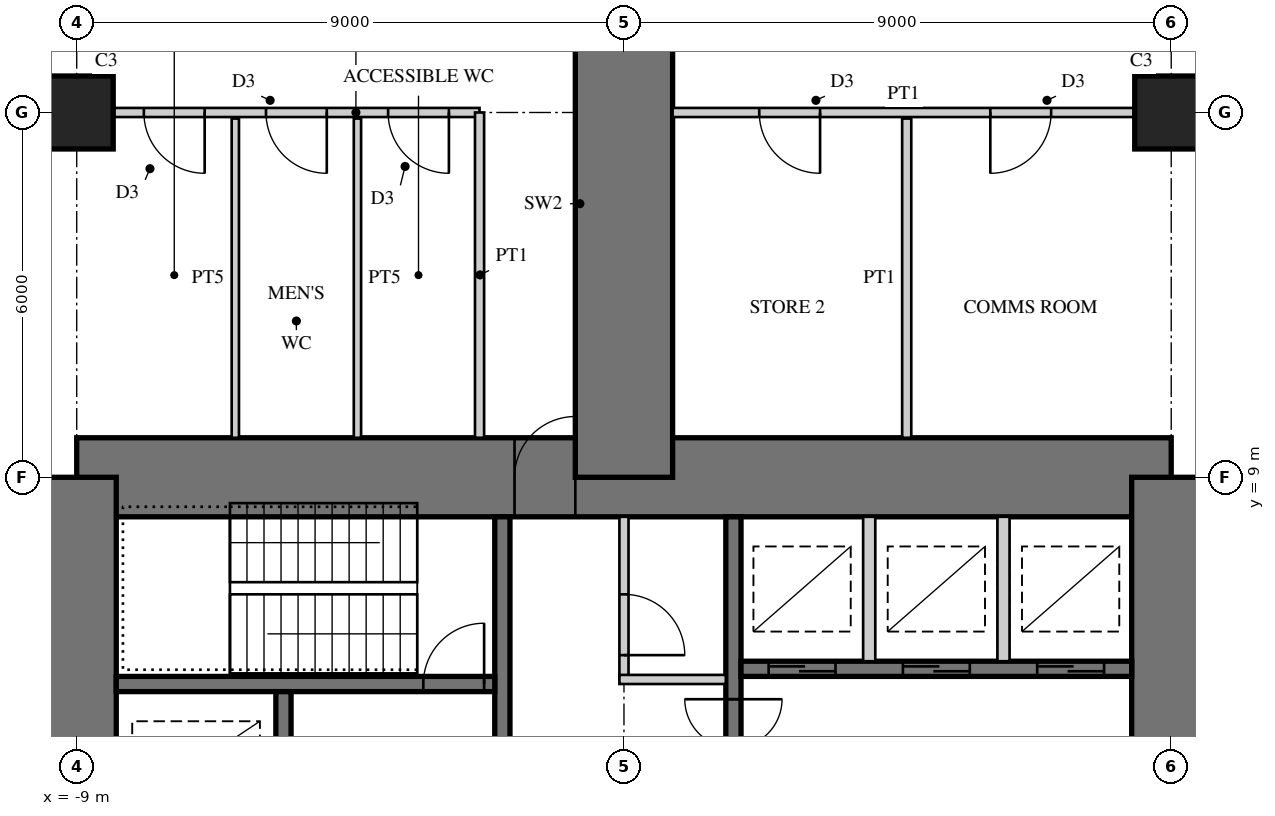
"""IFC4 building model, lengths in metres.
Left out: names, types, materials, properties, quantities, classifications, styles, units other than length and angle.
Written with IfcOpenShell. Run it as: python <this file> out.ifc"""

import sys

from ifc_helpers import new_model, si_unit, direction, frame, frame_2d, origin, origin_2d, place, context, subcontext, project, spatial, rectangle, extrude, element, fill, save


model = new_model("IFC4")
c1 = context("Model", 3, precision=1e-05, world=origin(), true_north=direction((0.0, 1.0)))
c2 = subcontext(c1, "Body", "Model", "MODEL_VIEW")
j1 = project(units=[si_unit("LENGTHUNIT", "METRE"), si_unit("PLANEANGLEUNIT", "RADIAN")], contexts=[c1])
p1 = place(None, origin())
s1 = spatial("IfcSite", under=j1, at=p1, CompositionType="ELEMENT")
p2 = place(p1, origin())
s2 = spatial("IfcBuilding", under=s1, at=p2, CompositionType="ELEMENT")
p3 = place(p2, frame((0.0, 0.0, 23.5)))
s3 = spatial("IfcBuildingStorey", under=s2, at=p3, CompositionType="ELEMENT", Elevation=23.5)
p4 = place(p3, frame((9.0, 9.0, 0.0), z_axis=(0.0, 0.0, 1.0), x_axis=(-1.0, 0.0, 0.0)))
e1 = element("IfcWall", 1, at=p4, inside=s3, PredefinedType="SHEAR", context=c2, shape_type="SweptSolid", body=[
    extrude(rectangle(XDim=18.0, YDim=1.3, at=frame_2d((9.0, 0.0))), origin(), (0.0, 0.0, 1.0), 4.0),
])
p5 = place(p4, frame((9.8, 0.0, 0.0)))
e2 = element("IfcOpeningElement", 2, at=p5, cuts=e1, PredefinedType="OPENING", context=c2, shape_type="SweptSolid", body=[
    extrude(rectangle(XDim=1.0, YDim=2.4, at=frame_2d((0.5, 1.2))), frame((0.0, 0.66, 0.0), z_axis=(0.0, -1.0, 0.0), x_axis=(1.0, 0.0, 0.0)), (0.0, 0.0, 1.0), 1.32),
])
p6 = place(p3, frame((9.0, -9.0, 0.0), z_axis=(0.0, 0.0, 1.0), x_axis=(0.0, 1.0, 0.0)))
e3 = element("IfcWall", 3, at=p6, inside=s3, PredefinedType="SHEAR", context=c2, shape_type="SweptSolid", body=[
    extrude(rectangle(XDim=18.0, YDim=1.3, at=frame_2d((9.0, 0.0))), origin(), (0.0, 0.0, 1.0), 4.0),
])
p7 = place(p6, frame((9.8, 0.0, 0.0)))
e4 = element("IfcOpeningElement", 4, at=p7, cuts=e3, PredefinedType="OPENING", context=c2, shape_type="SweptSolid", body=[
    extrude(rectangle(XDim=1.0, YDim=2.4, at=frame_2d((0.5, 1.2))), frame((0.0, 0.66, 0.0), z_axis=(0.0, -1.0, 0.0), x_axis=(1.0, 0.0, 0.0)), (0.0, 0.0, 1.0), 1.32),
])
p8 = place(p3, frame((-9.0, 9.0, 0.0), z_axis=(0.0, 0.0, 1.0), x_axis=(0.0, -1.0, 0.0)))
e5 = element("IfcWall", 5, at=p8, inside=s3, PredefinedType="SHEAR", context=c2, shape_type="SweptSolid", body=[
    extrude(rectangle(XDim=18.0, YDim=1.3, at=frame_2d((9.0, 0.0))), origin(), (0.0, 0.0, 1.0), 4.0),
])
p9 = place(p8, frame((9.8, 0.0, 0.0)))
e6 = element("IfcOpeningElement", 6, at=p9, cuts=e5, PredefinedType="OPENING", context=c2, shape_type="SweptSolid", body=[
    extrude(rectangle(XDim=1.0, YDim=2.4, at=frame_2d((0.5, 1.2))), frame((0.0, 0.66, 0.0), z_axis=(0.0, -1.0, 0.0), x_axis=(1.0, 0.0, 0.0)), (0.0, 0.0, 1.0), 1.32),
])
p10 = place(p3, frame((1.8, 1.875, 0.0), z_axis=(0.0, 0.0, 1.0), x_axis=(0.0, 1.0, 0.0)))
e7 = element("IfcWall", 7, at=p10, inside=s3, PredefinedType="SHEAR", context=c2, shape_type="SweptSolid", body=[
    extrude(rectangle(XDim=6.475, YDim=0.25, at=frame_2d((3.238, 0.0))), origin(), (0.0, 0.0, 1.0), 4.0),
])
p11 = place(p10, frame((1.875, 0.0, 0.0)))
e8 = element("IfcOpeningElement", 8, at=p11, cuts=e7, PredefinedType="OPENING", context=c2, shape_type="SweptSolid", body=[
    extrude(rectangle(XDim=1.6, YDim=2.4, at=frame_2d((0.8, 1.2))), frame((0.0, 0.135, 0.0), z_axis=(0.0, -1.0, 0.0), x_axis=(1.0, 0.0, 0.0)), (0.0, 0.0, 1.0), 0.27),
])
p12 = place(p3, frame((1.925, 5.85, 0.0), z_axis=(0.0, 0.0, 1.0), x_axis=(1.0, 0.0, 0.0)))
e9 = element("IfcWall", 9, at=p12, inside=s3, PredefinedType="SHEAR", context=c2, shape_type="SweptSolid", body=[
    extrude(rectangle(XDim=6.425, YDim=0.25, at=frame_2d((3.212, 0.0))), origin(), (0.0, 0.0, 1.0), 4.0),
])
p13 = place(p12, frame((0.454, 0.0, 0.0)))
e10 = element("IfcOpeningElement", 10, at=p13, cuts=e9, PredefinedType="OPENING", context=c2, shape_type="SweptSolid", body=[
    extrude(rectangle(XDim=1.1, YDim=2.2, at=frame_2d((0.55, 1.1))), frame((0.0, 0.135, 0.0), z_axis=(0.0, -1.0, 0.0), x_axis=(1.0, 0.0, 0.0)), (0.0, 0.0, 1.0), 0.27),
])
p14 = place(p12, frame((2.663, 0.0, 0.0)))
e11 = element("IfcOpeningElement", 11, at=p14, cuts=e9, PredefinedType="OPENING", context=c2, shape_type="SweptSolid", body=[
    extrude(rectangle(XDim=1.1, YDim=2.2, at=frame_2d((0.55, 1.1))), frame((0.0, 0.135, 0.0), z_axis=(0.0, -1.0, 0.0), x_axis=(1.0, 0.0, 0.0)), (0.0, 0.0, 1.0), 0.27),
])
p15 = place(p12, frame((4.871, 0.0, 0.0)))
e12 = element("IfcOpeningElement", 12, at=p15, cuts=e9, PredefinedType="OPENING", context=c2, shape_type="SweptSolid", body=[
    extrude(rectangle(XDim=1.1, YDim=2.2, at=frame_2d((0.55, 1.1))), frame((0.0, 0.135, 0.0), z_axis=(0.0, -1.0, 0.0), x_axis=(1.0, 0.0, 0.0)), (0.0, 0.0, 1.0), 0.27),
])
for number, where, z_axis, x_axis in (
    (13, (4.033, 5.975, 0.0), (0.0, 0.0, 1.0), (0.0, 1.0, 0.0)),
    (14, (6.242, 5.975, 0.0), (0.0, 0.0, 1.0), (0.0, 1.0, 0.0)),
):
    element("IfcWall", number, at=place(p3, frame(where, z_axis=z_axis, x_axis=x_axis)), inside=s3, PredefinedType="PARTITIONING", context=c2, shape_type="SweptSolid", body=[
        extrude(rectangle(XDim=2.375, YDim=0.2, at=frame_2d((1.188, 0.0))), origin(), (0.0, 0.0, 1.0), 4.0),
    ])
p16 = place(p3, frame((-2.0, 1.675, 0.0), z_axis=(0.0, 0.0, 1.0), x_axis=(0.0, 1.0, 0.0)))
e15 = element("IfcWall", 15, at=p16, inside=s3, PredefinedType="SHEAR", context=c2, shape_type="SweptSolid", body=[
    extrude(rectangle(XDim=6.675, YDim=0.25, at=frame_2d((3.337, 0.0))), origin(), (0.0, 0.0, 1.0), 4.0),
])
p17 = place(p16, frame((0.725, 0.0, 0.0)))
e16 = element("IfcOpeningElement", 16, at=p17, cuts=e15, PredefinedType="OPENING", context=c2, shape_type="SweptSolid", body=[
    extrude(rectangle(XDim=1.0, YDim=2.1, at=frame_2d((0.5, 1.05))), frame((0.0, 0.135, 0.0), z_axis=(0.0, -1.0, 0.0), x_axis=(1.0, 0.0, 0.0)), (0.0, 0.0, 1.0), 0.27),
])
p18 = place(p3, frame((-2.125, 5.6, 0.0), z_axis=(0.0, 0.0, 1.0), x_axis=(-1.0, 0.0, 0.0)))
e17 = element("IfcWall", 17, at=p18, inside=s3, PredefinedType="SHEAR", context=c2, shape_type="SweptSolid", body=[
    extrude(rectangle(XDim=6.225, YDim=0.25, at=frame_2d((3.113, 0.0))), origin(), (0.0, 0.0, 1.0), 4.0),
])
p19 = place(p18, frame((0.175, 0.0, 0.0)))
e18 = element("IfcOpeningElement", 18, at=p19, cuts=e17, PredefinedType="OPENING", context=c2, shape_type="SweptSolid", body=[
    extrude(rectangle(XDim=1.0, YDim=2.1, at=frame_2d((0.5, 1.05))), frame((0.0, 0.135, 0.0), z_axis=(0.0, -1.0, 0.0), x_axis=(1.0, 0.0, 0.0)), (0.0, 0.0, 1.0), 0.27),
])
p20 = place(p3, frame((-5.6, 1.925, 0.0), z_axis=(0.0, 0.0, 1.0), x_axis=(0.0, 1.0, 0.0)))
e19 = element("IfcWall", 19, at=p20, inside=s3, PredefinedType="SHEAR", context=c2, shape_type="SweptSolid", body=[
    extrude(rectangle(XDim=3.55, YDim=0.25, at=frame_2d((1.775, 0.0))), origin(), (0.0, 0.0, 1.0), 4.0),
])
p21 = place(p20, frame((1.525, 0.0, 0.0)))
e20 = element("IfcOpeningElement", 20, at=p21, cuts=e19, PredefinedType="OPENING", context=c2, shape_type="SweptSolid", body=[
    extrude(rectangle(XDim=1.1, YDim=2.2, at=frame_2d((0.55, 1.1))), frame((0.0, 0.135, 0.0), z_axis=(0.0, -1.0, 0.0), x_axis=(1.0, 0.0, 0.0)), (0.0, 0.0, 1.0), 0.27),
])
p22 = place(p20, frame((0.075, 0.0, 0.0)))
e21 = element("IfcOpeningElement", 21, at=p22, cuts=e19, PredefinedType="OPENING", context=c2, shape_type="SweptSolid", body=[
    extrude(rectangle(XDim=0.8, YDim=2.1, at=frame_2d((0.4, 1.05))), frame((0.0, 0.135, 0.0), z_axis=(0.0, -1.0, 0.0), x_axis=(1.0, 0.0, 0.0)), (0.0, 0.0, 1.0), 0.27),
])
p23 = place(p3, frame((0.0, 9.0, 0.0), z_axis=(0.0, 0.0, 1.0), x_axis=(0.0, 1.0, 0.0)))
e22 = element("IfcWall", 22, at=p23, inside=s3, PredefinedType="SHEAR", context=c2, shape_type="SweptSolid", body=[
    extrude(rectangle(XDim=9.0, YDim=1.6, at=frame_2d((4.5, 0.0))), origin(), (0.0, 0.0, 1.0), 4.0),
])
for number, where, z_axis, x_axis in (
    (23, (9.0, 15.0, 0.0), (0.0, 0.0, 1.0), (1.0, 0.0, 0.0)),
    (24, (-9.0, 15.0, 0.0), (0.0, 0.0, 1.0), (1.0, 0.0, 0.0)),
):
    element("IfcColumn", number, at=place(p3, frame(where, z_axis=z_axis, x_axis=x_axis)), inside=s3, PredefinedType="COLUMN", context=c2, shape_type="SweptSolid", body=[
        extrude(rectangle(XDim=1.2, YDim=1.2, at=origin_2d()), origin(), (0.0, 0.0, 1.0), 4.0),
    ])
p24 = place(p3, frame((0.0, 5.675, 0.0), z_axis=(0.0, 0.0, 1.0), x_axis=(0.0, 1.0, 0.0)))
e25 = element("IfcWall", 25, at=p24, inside=s3, PredefinedType="PARTITIONING", context=c2, shape_type="SweptSolid", body=[
    extrude(rectangle(XDim=2.675, YDim=0.15, at=frame_2d((1.337, 0.0))), origin(), (0.0, 0.0, 1.0), 3.8),
])
p25 = place(p24, frame((0.4, 0.0, 0.0)))
e26 = element("IfcOpeningElement", 26, at=p25, cuts=e25, PredefinedType="OPENING", context=c2, shape_type="SweptSolid", body=[
    extrude(rectangle(XDim=1.0, YDim=2.1, at=frame_2d((0.5, 1.05))), frame((0.0, 0.085, 0.0), z_axis=(0.0, -1.0, 0.0), x_axis=(1.0, 0.0, 0.0)), (0.0, 0.0, 1.0), 0.17),
])
p26 = place(p3, frame((1.675, 5.675, 0.0), z_axis=(0.0, 0.0, 1.0), x_axis=(-1.0, 0.0, 0.0)))
e27 = element("IfcWall", 27, at=p26, inside=s3, PredefinedType="PARTITIONING", context=c2, shape_type="SweptSolid", body=[
    extrude(rectangle(XDim=1.75, YDim=0.15, at=frame_2d((0.875, 0.0))), origin(), (0.0, 0.0, 1.0), 3.8),
])
p27 = place(p3, frame((-2.375, 15.0, 0.0), z_axis=(0.0, 0.0, 1.0), x_axis=(-1.0, 0.0, 0.0)))
e28 = element("IfcWall", 28, at=p27, inside=s3, PredefinedType="PARTITIONING", context=c2, shape_type="SweptSolid", body=[
    extrude(rectangle(XDim=6.025, YDim=0.15, at=frame_2d((3.012, 0.0))), origin(), (0.0, 0.0, 1.0), 2.95),
])
p28 = place(p27, frame((0.504, 0.0, 0.0)))
e29 = element("IfcOpeningElement", 29, at=p28, cuts=e28, PredefinedType="OPENING", context=c2, shape_type="SweptSolid", body=[
    extrude(rectangle(XDim=1.0, YDim=2.1, at=frame_2d((0.5, 1.05))), frame((0.0, 0.085, 0.0), z_axis=(0.0, -1.0, 0.0), x_axis=(1.0, 0.0, 0.0)), (0.0, 0.0, 1.0), 0.17),
])
p29 = place(p27, frame((2.512, 0.0, 0.0)))
e30 = element("IfcOpeningElement", 30, at=p29, cuts=e28, PredefinedType="OPENING", context=c2, shape_type="SweptSolid", body=[
    extrude(rectangle(XDim=1.0, YDim=2.1, at=frame_2d((0.5, 1.05))), frame((0.0, 0.085, 0.0), z_axis=(0.0, -1.0, 0.0), x_axis=(1.0, 0.0, 0.0)), (0.0, 0.0, 1.0), 0.17),
])
p30 = place(p27, frame((4.521, 0.0, 0.0)))
e31 = element("IfcOpeningElement", 31, at=p30, cuts=e28, PredefinedType="OPENING", context=c2, shape_type="SweptSolid", body=[
    extrude(rectangle(XDim=1.0, YDim=2.1, at=frame_2d((0.5, 1.05))), frame((0.0, 0.085, 0.0), z_axis=(0.0, -1.0, 0.0), x_axis=(1.0, 0.0, 0.0)), (0.0, 0.0, 1.0), 0.17),
])
p31 = place(p3, frame((-2.375, 9.65, 0.0), z_axis=(0.0, 0.0, 1.0), x_axis=(0.0, 1.0, 0.0)))
e32 = element("IfcWall", 32, at=p31, inside=s3, PredefinedType="PARTITIONING", context=c2, shape_type="SweptSolid", body=[
    extrude(rectangle(XDim=5.35, YDim=0.15, at=frame_2d((2.675, 0.0))), origin(), (0.0, 0.0, 1.0), 3.8),
])
for number, where, z_axis, x_axis in (
    (33, (-4.383, 9.65, 0.0), (0.0, 0.0, 1.0), (0.0, 1.0, 0.0)),
    (34, (-6.392, 9.65, 0.0), (0.0, 0.0, 1.0), (0.0, 1.0, 0.0)),
):
    element("IfcWall", number, at=place(p3, frame(where, z_axis=z_axis, x_axis=x_axis)), inside=s3, PredefinedType="PLUMBINGWALL", context=c2, shape_type="SweptSolid", body=[
        extrude(rectangle(XDim=5.25, YDim=0.12, at=frame_2d((2.625, 0.0))), origin(), (0.0, 0.0, 1.0), 3.8),
    ])
p32 = place(p3, frame((8.4, 15.0, 0.0), z_axis=(0.0, 0.0, 1.0), x_axis=(-1.0, 0.0, 0.0)))
e35 = element("IfcWall", 35, at=p32, inside=s3, PredefinedType="PARTITIONING", context=c2, shape_type="SweptSolid", body=[
    extrude(rectangle(XDim=7.6, YDim=0.15, at=frame_2d((3.8, 0.0))), origin(), (0.0, 0.0, 1.0), 2.95),
])
p33 = place(p32, frame((1.375, 0.0, 0.0)))
e36 = element("IfcOpeningElement", 36, at=p33, cuts=e35, PredefinedType="OPENING", context=c2, shape_type="SweptSolid", body=[
    extrude(rectangle(XDim=1.0, YDim=2.1, at=frame_2d((0.5, 1.05))), frame((0.0, 0.085, 0.0), z_axis=(0.0, -1.0, 0.0), x_axis=(1.0, 0.0, 0.0)), (0.0, 0.0, 1.0), 0.17),
])
p34 = place(p32, frame((5.175, 0.0, 0.0)))
e37 = element("IfcOpeningElement", 37, at=p34, cuts=e35, PredefinedType="OPENING", context=c2, shape_type="SweptSolid", body=[
    extrude(rectangle(XDim=1.0, YDim=2.1, at=frame_2d((0.5, 1.05))), frame((0.0, 0.085, 0.0), z_axis=(0.0, -1.0, 0.0), x_axis=(1.0, 0.0, 0.0)), (0.0, 0.0, 1.0), 0.17),
])
p35 = place(p3, frame((4.65, 9.65, 0.0), z_axis=(0.0, 0.0, 1.0), x_axis=(0.0, 1.0, 0.0)))
e38 = element("IfcWall", 38, at=p35, inside=s3, PredefinedType="PARTITIONING", context=c2, shape_type="SweptSolid", body=[
    extrude(rectangle(XDim=5.25, YDim=0.15, at=frame_2d((2.625, 0.0))), origin(), (0.0, 0.0, 1.0), 3.8),
])
p36 = place(p25, frame((1.0, 0.0, 0.0), z_axis=(0.0, 0.0, 1.0), x_axis=(-1.0, 0.0, 0.0)))
e39 = element("IfcDoor", 39, at=p36, inside=s3, OperationType="SINGLE_SWING_RIGHT", PredefinedType="DOOR", context=c2, shape_type="SweptSolid", body=[
    extrude(rectangle(XDim=1.0, YDim=2.1, at=frame_2d((0.5, 1.05))), frame((0.0, 0.025, 0.0), z_axis=(0.0, -1.0, 0.0), x_axis=(1.0, 0.0, 0.0)), (0.0, 0.0, 1.0), 0.05),
])
fill(e26, e39)
p37 = place(p28, origin())
e40 = element("IfcDoor", 40, at=p37, inside=s3, OperationType="SINGLE_SWING_LEFT", PredefinedType="DOOR", context=c2, shape_type="SweptSolid", body=[
    extrude(rectangle(XDim=1.0, YDim=2.1, at=frame_2d((0.5, 1.05))), frame((0.0, 0.025, 0.0), z_axis=(0.0, -1.0, 0.0), x_axis=(1.0, 0.0, 0.0)), (0.0, 0.0, 1.0), 0.05),
])
fill(e29, e40)
p38 = place(p29, origin())
e41 = element("IfcDoor", 41, at=p38, inside=s3, OperationType="SINGLE_SWING_LEFT", PredefinedType="DOOR", context=c2, shape_type="SweptSolid", body=[
    extrude(rectangle(XDim=1.0, YDim=2.1, at=frame_2d((0.5, 1.05))), frame((0.0, 0.025, 0.0), z_axis=(0.0, -1.0, 0.0), x_axis=(1.0, 0.0, 0.0)), (0.0, 0.0, 1.0), 0.05),
])
fill(e30, e41)
p39 = place(p30, origin())
e42 = element("IfcDoor", 42, at=p39, inside=s3, OperationType="SINGLE_SWING_LEFT", PredefinedType="DOOR", context=c2, shape_type="SweptSolid", body=[
    extrude(rectangle(XDim=1.0, YDim=2.1, at=frame_2d((0.5, 1.05))), frame((0.0, 0.025, 0.0), z_axis=(0.0, -1.0, 0.0), x_axis=(1.0, 0.0, 0.0)), (0.0, 0.0, 1.0), 0.05),
])
fill(e31, e42)
p40 = place(p33, origin())
e43 = element("IfcDoor", 43, at=p40, inside=s3, OperationType="SINGLE_SWING_RIGHT", PredefinedType="DOOR", context=c2, shape_type="SweptSolid", body=[
    extrude(rectangle(XDim=1.0, YDim=2.1, at=frame_2d((0.5, 1.05))), frame((0.0, 0.025, 0.0), z_axis=(0.0, -1.0, 0.0), x_axis=(1.0, 0.0, 0.0)), (0.0, 0.0, 1.0), 0.05),
])
fill(e36, e43)
p41 = place(p34, origin())
e44 = element("IfcDoor", 44, at=p41, inside=s3, OperationType="SINGLE_SWING_LEFT", PredefinedType="DOOR", context=c2, shape_type="SweptSolid", body=[
    extrude(rectangle(XDim=1.0, YDim=2.1, at=frame_2d((0.5, 1.05))), frame((0.0, 0.025, 0.0), z_axis=(0.0, -1.0, 0.0), x_axis=(1.0, 0.0, 0.0)), (0.0, 0.0, 1.0), 0.05),
])
fill(e37, e44)
p42 = place(p5, frame((1.0, 0.0, 0.0), z_axis=(0.0, 0.0, 1.0), x_axis=(-1.0, 0.0, 0.0)))
e45 = element("IfcDoor", 45, at=p42, inside=s3, OperationType="SINGLE_SWING_RIGHT", PredefinedType="DOOR", context=c2, shape_type="SweptSolid", body=[
    extrude(rectangle(XDim=1.0, YDim=2.4, at=frame_2d((0.5, 1.2))), frame((0.0, -0.005, 0.0), z_axis=(0.0, -1.0, 0.0), x_axis=(1.0, 0.0, 0.0)), (0.0, 0.0, 1.0), 0.05),
])
fill(e2, e45)
p43 = place(p13, origin())
e46 = element("IfcDoor", 46, at=p43, inside=s3, OperationType="DOUBLE_DOOR_SLIDING", PredefinedType="DOOR", context=c2, shape_type="SweptSolid", body=[
    extrude(rectangle(XDim=1.1, YDim=2.2, at=frame_2d((0.55, 1.1))), frame((0.0, 0.025, 0.0), z_axis=(0.0, -1.0, 0.0), x_axis=(1.0, 0.0, 0.0)), (0.0, 0.0, 1.0), 0.05),
])
fill(e10, e46)
p44 = place(p14, origin())
e47 = element("IfcDoor", 47, at=p44, inside=s3, OperationType="DOUBLE_DOOR_SLIDING", PredefinedType="DOOR", context=c2, shape_type="SweptSolid", body=[
    extrude(rectangle(XDim=1.1, YDim=2.2, at=frame_2d((0.55, 1.1))), frame((0.0, 0.025, 0.0), z_axis=(0.0, -1.0, 0.0), x_axis=(1.0, 0.0, 0.0)), (0.0, 0.0, 1.0), 0.05),
])
fill(e11, e47)
p45 = place(p15, origin())
e48 = element("IfcDoor", 48, at=p45, inside=s3, OperationType="DOUBLE_DOOR_SLIDING", PredefinedType="DOOR", context=c2, shape_type="SweptSolid", body=[
    extrude(rectangle(XDim=1.1, YDim=2.2, at=frame_2d((0.55, 1.1))), frame((0.0, 0.025, 0.0), z_axis=(0.0, -1.0, 0.0), x_axis=(1.0, 0.0, 0.0)), (0.0, 0.0, 1.0), 0.05),
])
fill(e12, e48)
p46 = place(p11, origin())
e49 = element("IfcDoor", 49, at=p46, inside=s3, OperationType="DOUBLE_DOOR_DOUBLE_SWING", PredefinedType="DOOR", context=c2, shape_type="SweptSolid", body=[
    extrude(rectangle(XDim=1.6, YDim=2.4, at=frame_2d((0.8, 1.2))), frame((0.0, 0.025, 0.0), z_axis=(0.0, -1.0, 0.0), x_axis=(1.0, 0.0, 0.0)), (0.0, 0.0, 1.0), 0.05),
])
fill(e8, e49)
p47 = place(p19, frame((1.0, 0.0, 0.0), z_axis=(0.0, 0.0, 1.0), x_axis=(-1.0, 0.0, 0.0)))
e50 = element("IfcDoor", 50, at=p47, inside=s3, OperationType="SINGLE_SWING_RIGHT", PredefinedType="DOOR", context=c2, shape_type="SweptSolid", body=[
    extrude(rectangle(XDim=1.0, YDim=2.1, at=frame_2d((0.5, 1.05))), frame((0.0, 0.025, 0.0), z_axis=(0.0, -1.0, 0.0), x_axis=(1.0, 0.0, 0.0)), (0.0, 0.0, 1.0), 0.05),
])
fill(e18, e50)
save(model, sys.argv[1])
